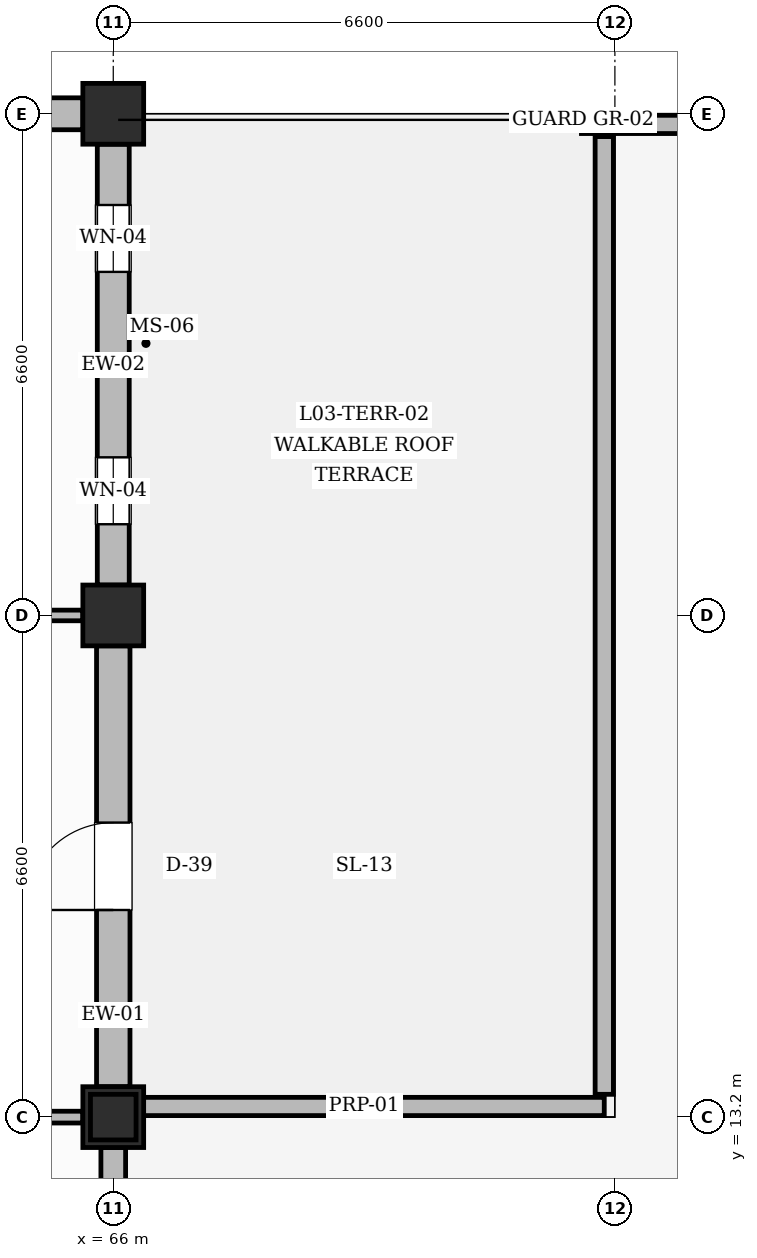
"""IFC4 building model, lengths in metres.
Left out: names, types, materials, properties, quantities, classifications, styles, units other than length and angle.
Written with IfcOpenShell. Run it as: python <this file> out.ifc"""

import sys

from ifc_helpers import new_model, si_unit, direction, frame, frame_2d, origin, origin_2d, place, context, subcontext, project, spatial, rectangle, extrude, element, fill, save


model = new_model("IFC4")
c1 = context("Model", 3, precision=1e-05, world=origin(), true_north=direction((0.0, 1.0)))
c2 = subcontext(c1, "Body", "Model", "MODEL_VIEW")
j1 = project(units=[si_unit("LENGTHUNIT", "METRE"), si_unit("PLANEANGLEUNIT", "RADIAN")], contexts=[c1])
p1 = place(None, origin())
s1 = spatial("IfcSite", under=j1, at=p1, CompositionType="ELEMENT")
p2 = place(p1, origin())
s2 = spatial("IfcBuilding", under=s1, at=p2, CompositionType="ELEMENT")
p3 = place(p2, frame((0.0, 0.0, 14.4)))
s3 = spatial("IfcBuildingStorey", under=s2, at=p3, CompositionType="ELEMENT", Elevation=14.4)
for number, where, z_axis, x_axis in (
    (1, (66.0, 13.2, 0.0), (0.0, 0.0, 1.0), (1.0, 0.0, 0.0)),
    (2, (66.0, 19.8, 0.0), (0.0, 0.0, 1.0), (1.0, 0.0, 0.0)),
    (3, (66.0, 26.4, 0.0), (0.0, 0.0, 1.0), (1.0, 0.0, 0.0)),
):
    element("IfcColumn", number, at=place(p3, frame(where, z_axis=z_axis, x_axis=x_axis)), inside=s3, PredefinedType="COLUMN", context=c2, shape_type="SweptSolid", body=[
        extrude(rectangle(XDim=0.8, YDim=0.8, at=origin_2d()), origin(), (0.0, 0.0, 1.0), 4.2),
    ])
p4 = place(p3, frame((66.0, 13.2, 4.2), z_axis=(0.0, 0.0, 1.0), x_axis=(1.0, 0.0, 0.0)))
e4 = element("IfcColumn", 4, at=p4, inside=s3, PredefinedType="COLUMN", context=c2, shape_type="SweptSolid", body=[
    extrude(rectangle(XDim=0.6, YDim=0.6, at=origin_2d()), origin(), (0.0, 0.0, 1.0), 0.65),
])
p5 = place(p3, frame((66.0, 7.0, 0.0), z_axis=(0.0, 0.0, 1.0), x_axis=(0.0, 1.0, 0.0)))
e5 = element("IfcWall", 5, at=p5, inside=s3, PredefinedType="SOLIDWALL", context=c2, shape_type="SweptSolid", body=[
    extrude(rectangle(XDim=5.8, YDim=0.325, at=frame_2d((2.9, 0.0))), origin(), (0.0, 0.0, 1.0), 3.26),
])
p6 = place(p5, frame((0.8, 0.0, 0.95)))
e6 = element("IfcOpeningElement", 6, at=p6, cuts=e5, PredefinedType="OPENING", context=c2, shape_type="SweptSolid", body=[
    extrude(rectangle(XDim=0.88, YDim=1.52, at=frame_2d((0.44, 0.76))), frame((0.0, 0.172, 0.0), z_axis=(0.0, -1.0, 0.0), x_axis=(1.0, 0.0, 0.0)), (0.0, 0.0, 1.0), 0.345),
])
p7 = place(p5, frame((4.12, 0.0, 0.95)))
e7 = element("IfcOpeningElement", 7, at=p7, cuts=e5, PredefinedType="OPENING", context=c2, shape_type="SweptSolid", body=[
    extrude(rectangle(XDim=0.88, YDim=1.52, at=frame_2d((0.44, 0.76))), frame((0.0, 0.172, 0.0), z_axis=(0.0, -1.0, 0.0), x_axis=(1.0, 0.0, 0.0)), (0.0, 0.0, 1.0), 0.345),
])
p8 = place(p3, frame((66.0, 13.6, 0.0), z_axis=(0.0, 0.0, 1.0), x_axis=(0.0, 1.0, 0.0)))
e8 = element("IfcWall", 8, at=p8, inside=s3, PredefinedType="SOLIDWALL", context=c2, shape_type="SweptSolid", body=[
    extrude(rectangle(XDim=5.8, YDim=0.44, at=frame_2d((2.9, 0.0))), origin(), (0.0, 0.0, 1.0), 3.26),
])
p9 = place(p8, frame((2.325, 0.0, 0.0)))
e9 = element("IfcOpeningElement", 9, at=p9, cuts=e8, PredefinedType="OPENING", context=c2, shape_type="SweptSolid", body=[
    extrude(rectangle(XDim=1.15, YDim=2.15, at=frame_2d((0.575, 1.075))), frame((0.0, 0.23, 0.0), z_axis=(0.0, -1.0, 0.0), x_axis=(1.0, 0.0, 0.0)), (0.0, 0.0, 1.0), 0.46),
])
p10 = place(p3, frame((59.8, 26.4, 0.0), z_axis=(0.0, 0.0, 1.0), x_axis=(1.0, 0.0, 0.0)))
e10 = element("IfcWall", 10, at=p10, inside=s3, PredefinedType="SOLIDWALL", context=c2, shape_type="SweptSolid", body=[
    extrude(rectangle(XDim=5.8, YDim=0.42, at=frame_2d((2.9, 0.0))), origin(), (0.0, 0.0, 1.0), 3.26),
])
p11 = place(p10, frame((0.8, 0.0, 0.95)))
e11 = element("IfcOpeningElement", 11, at=p11, cuts=e10, PredefinedType="OPENING", context=c2, shape_type="SweptSolid", body=[
    extrude(rectangle(XDim=0.88, YDim=1.74, at=frame_2d((0.44, 0.87))), frame((0.0, 0.22, 0.0), z_axis=(0.0, -1.0, 0.0), x_axis=(1.0, 0.0, 0.0)), (0.0, 0.0, 1.0), 0.44),
])
p12 = place(p10, frame((4.12, 0.0, 0.95)))
e12 = element("IfcOpeningElement", 12, at=p12, cuts=e10, PredefinedType="OPENING", context=c2, shape_type="SweptSolid", body=[
    extrude(rectangle(XDim=0.88, YDim=1.74, at=frame_2d((0.44, 0.87))), frame((0.0, 0.22, 0.0), z_axis=(0.0, -1.0, 0.0), x_axis=(1.0, 0.0, 0.0)), (0.0, 0.0, 1.0), 0.44),
])
p13 = place(p3, frame((66.0, 20.2, 0.0), z_axis=(0.0, 0.0, 1.0), x_axis=(0.0, 1.0, 0.0)))
e13 = element("IfcWall", 13, at=p13, inside=s3, PredefinedType="SOLIDWALL", context=c2, shape_type="SweptSolid", body=[
    extrude(rectangle(XDim=5.8, YDim=0.42, at=frame_2d((2.9, 0.0))), origin(), (0.0, 0.0, 1.0), 3.26),
])
p14 = place(p13, frame((0.8, 0.0, 0.95)))
e14 = element("IfcOpeningElement", 14, at=p14, cuts=e13, PredefinedType="OPENING", context=c2, shape_type="SweptSolid", body=[
    extrude(rectangle(XDim=0.88, YDim=1.96, at=frame_2d((0.44, 0.98))), frame((0.0, 0.22, 0.0), z_axis=(0.0, -1.0, 0.0), x_axis=(1.0, 0.0, 0.0)), (0.0, 0.0, 1.0), 0.44),
])
p15 = place(p13, frame((4.12, 0.0, 0.95)))
e15 = element("IfcOpeningElement", 15, at=p15, cuts=e13, PredefinedType="OPENING", context=c2, shape_type="SweptSolid", body=[
    extrude(rectangle(XDim=0.88, YDim=1.96, at=frame_2d((0.44, 0.98))), frame((0.0, 0.22, 0.0), z_axis=(0.0, -1.0, 0.0), x_axis=(1.0, 0.0, 0.0)), (0.0, 0.0, 1.0), 0.44),
])
p16 = place(p3, frame((66.14, 13.34, 0.0), z_axis=(0.0, 0.0, 1.0), x_axis=(1.0, 0.0, 0.0)))
e16 = element("IfcWall", 16, at=p16, inside=s3, PredefinedType="PARAPET", context=c2, shape_type="SweptSolid", body=[
    extrude(rectangle(XDim=6.32, YDim=0.24, at=frame_2d((3.16, 0.0))), origin(), (0.0, 0.0, 1.0), 1.15),
])
for number, where, z_axis, x_axis in (
    (17, (72.46, 13.5, 0.0), (0.0, 0.0, 1.0), (0.0, 1.0, 0.0)),
    (18, (72.46, 20.1, 0.0), (0.0, 0.0, 1.0), (0.0, 1.0, 0.0)),
):
    element("IfcWall", number, at=place(p3, frame(where, z_axis=z_axis, x_axis=x_axis)), inside=s3, PredefinedType="PARAPET", context=c2, shape_type="SweptSolid", body=[
        extrude(rectangle(XDim=6.0, YDim=0.24, at=frame_2d((3.0, 0.0))), origin(), (0.0, 0.0, 1.0), 1.15),
    ])
p17 = place(p3, frame((72.16, 26.26, 0.0), z_axis=(0.0, 0.0, 1.0), x_axis=(1.0, 0.0, 0.0)))
e19 = element("IfcWall", 19, at=p17, inside=s3, PredefinedType="PARAPET", context=c2, shape_type="SweptSolid", body=[
    extrude(rectangle(XDim=0.16, YDim=0.24, at=frame_2d((0.08, 0.0))), origin(), (0.0, 0.0, 1.0), 1.15),
])
p18 = place(p3, frame((72.74, 26.26, 0.0), z_axis=(0.0, 0.0, 1.0), x_axis=(1.0, 0.0, 0.0)))
e20 = element("IfcWall", 20, at=p18, inside=s3, PredefinedType="PARAPET", context=c2, shape_type="SweptSolid", body=[
    extrude(rectangle(XDim=6.32, YDim=0.24, at=frame_2d((3.16, 0.0))), origin(), (0.0, 0.0, 1.0), 1.15),
])
p19 = place(p3, frame((59.8, 13.2, 0.0), z_axis=(0.0, 0.0, 1.0), x_axis=(1.0, 0.0, 0.0)))
e21 = element("IfcWall", 21, at=p19, inside=s3, PredefinedType="PARTITIONING", context=c2, shape_type="SweptSolid", body=[
    extrude(rectangle(XDim=5.8, YDim=0.155, at=frame_2d((2.9, 0.0))), origin(), (0.0, 0.0, 1.0), 3.16),
])
p20 = place(p3, frame((59.8, 19.8, 0.0), z_axis=(0.0, 0.0, 1.0), x_axis=(1.0, 0.0, 0.0)))
e22 = element("IfcWall", 22, at=p20, inside=s3, PredefinedType="PARTITIONING", context=c2, shape_type="SweptSolid", body=[
    extrude(rectangle(XDim=5.8, YDim=0.14, at=frame_2d((2.9, 0.0))), origin(), (0.0, 0.0, 1.0), 3.16),
])
p21 = place(p9, origin())
e23 = element("IfcDoor", 23, at=p21, inside=s3, OperationType="SINGLE_SWING_LEFT", PredefinedType="DOOR", context=c2, shape_type="SweptSolid", body=[
    extrude(rectangle(XDim=1.15, YDim=2.15, at=frame_2d((0.575, 1.075))), frame((0.0, 0.025, 0.0), z_axis=(0.0, -1.0, 0.0), x_axis=(1.0, 0.0, 0.0)), (0.0, 0.0, 1.0), 0.05),
])
fill(e9, e23)
p22 = place(p14, origin())
e24 = element("IfcWindow", 24, at=p22, inside=s3, PartitioningType="SINGLE_PANEL", PredefinedType="WINDOW", context=c2, shape_type="SweptSolid", body=[
    extrude(rectangle(XDim=0.88, YDim=1.96, at=frame_2d((0.44, 0.98))), frame((0.0, 0.03, 0.0), z_axis=(0.0, -1.0, 0.0), x_axis=(1.0, 0.0, 0.0)), (0.0, 0.0, 1.0), 0.06),
])
fill(e14, e24)
p23 = place(p15, origin())
e25 = element("IfcWindow", 25, at=p23, inside=s3, PartitioningType="SINGLE_PANEL", PredefinedType="WINDOW", context=c2, shape_type="SweptSolid", body=[
    extrude(rectangle(XDim=0.88, YDim=1.96, at=frame_2d((0.44, 0.98))), frame((0.0, 0.03, 0.0), z_axis=(0.0, -1.0, 0.0), x_axis=(1.0, 0.0, 0.0)), (0.0, 0.0, 1.0), 0.06),
])
fill(e15, e25)
save(model, sys.argv[1])
